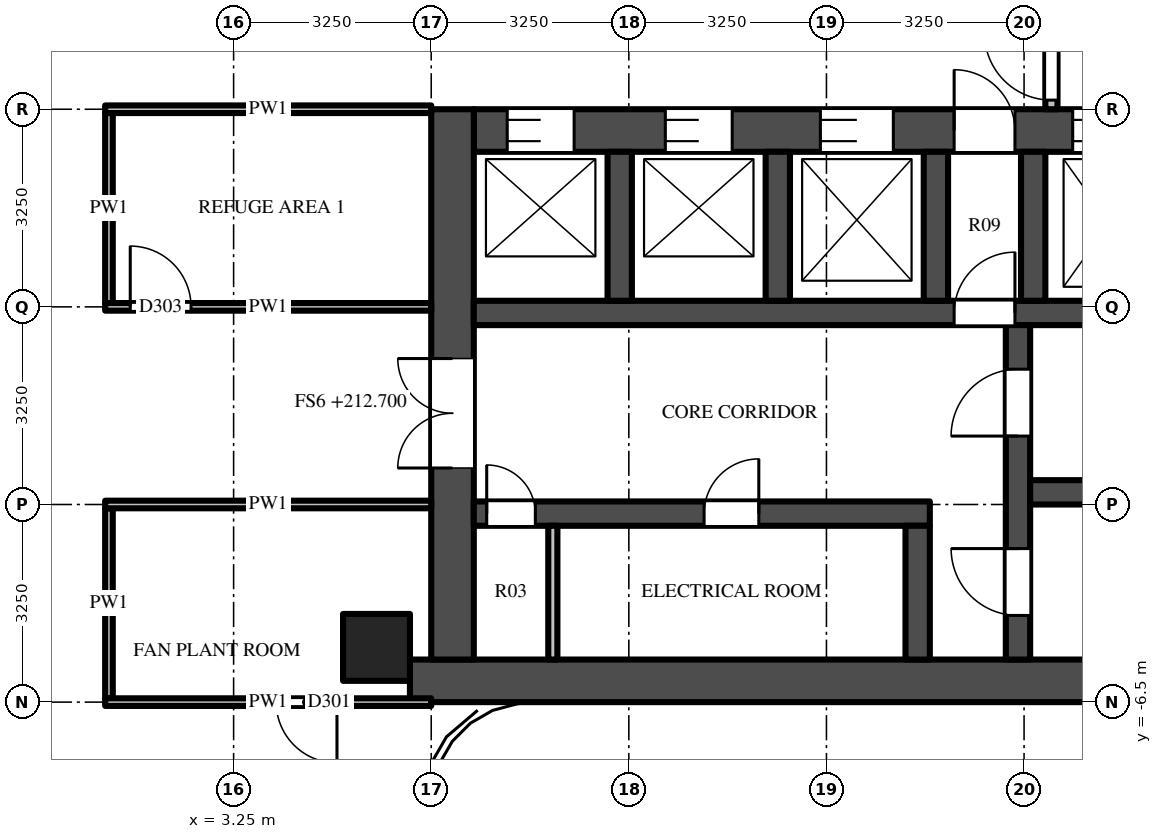
"""IFC4 building model, lengths in metres.
Left out: names, types, materials, properties, quantities, classifications, styles, units other than length and angle.
Written with IfcOpenShell. Run it as: python <this file> out.ifc"""

import sys

from ifc_helpers import new_model, si_unit, direction, frame, frame_2d, origin, origin_2d, place, context, subcontext, project, spatial, rectangle, extrude, source, transform, mapped, element, fill, save


model = new_model("IFC4")
c1 = context("Model", 3, precision=1e-05, world=origin(), true_north=direction((0.0, 1.0)))
c2 = subcontext(c1, "Body", "Model", "MODEL_VIEW")
j1 = project(units=[si_unit("LENGTHUNIT", "METRE"), si_unit("PLANEANGLEUNIT", "RADIAN")], contexts=[c1])
p1 = place(None, origin())
s1 = spatial("IfcSite", under=j1, at=p1, CompositionType="ELEMENT")
p2 = place(p1, origin())
s2 = spatial("IfcBuilding", under=s1, at=p2, CompositionType="ELEMENT")
p3 = place(p2, frame((0.0, 0.0, 212.7)))
s3 = spatial("IfcBuildingStorey", under=s2, at=p3, CompositionType="ELEMENT", Elevation=212.7)
m1 = source(origin(), c2, "Body", "SweptSolid", [
    extrude(rectangle(XDim=1.1, YDim=1.1, at=origin_2d()), origin(), (0.0, 0.0, 1.0), 8.0),
])
p4 = place(p3, frame((5.6, -5.6, 0.0), z_axis=(0.0, 0.0, 1.0), x_axis=(1.0, 0.0, 0.0)))
e1 = element("IfcColumn", 1, at=p4, inside=s3, PredefinedType="COLUMN", context=c2, shape_type="MappedRepresentation", body=[
    mapped(m1, transform((0.0, 0.0, 0.0))),
])
m2 = source(origin(), c2, "Body", "SweptSolid", [
    extrude(rectangle(XDim=16.6, YDim=0.7, at=frame_2d((8.3, 0.0))), origin(), (0.0, 0.0, 1.0), 7.8),
])
p5 = place(p3, frame((6.15, -6.15, 0.0), z_axis=(0.0, 0.0, 1.0), x_axis=(1.0, 0.0, 0.0)))
e2 = element("IfcWall", 2, at=p5, inside=s3, PredefinedType="SHEAR", context=c2, shape_type="MappedRepresentation", body=[
    mapped(m2, transform((0.0, 0.0, 0.0))),
])
m3 = source(origin(), c2, "Body", "SweptSolid", [
    extrude(rectangle(XDim=14.85, YDim=0.7, at=frame_2d((7.425, 0.0))), origin(), (0.0, 0.0, 1.0), 7.8),
])
p6 = place(p3, frame((7.2, 2.9, 0.0), z_axis=(0.0, 0.0, 1.0), x_axis=(1.0, 0.0, 0.0)))
e3 = element("IfcWall", 3, at=p6, inside=s3, PredefinedType="SHEAR", context=c2, shape_type="MappedRepresentation", body=[
    mapped(m3, transform((0.0, 0.0, 0.0))),
])
m4 = source(origin(), c2, "Body", "SweptSolid", [
    extrude(rectangle(XDim=1.1, YDim=2.1, at=frame_2d((0.55, 1.05))), frame((0.0, 0.36, 0.0), z_axis=(0.0, -1.0, 0.0), x_axis=(1.0, 0.0, 0.0)), (0.0, 0.0, 1.0), 0.72),
])
p7 = place(p6, frame((0.55, 0.0, 0.0)))
e4 = element("IfcOpeningElement", 4, at=p7, cuts=e3, PredefinedType="OPENING", context=c2, shape_type="MappedRepresentation", body=[
    mapped(m4, transform((0.0, 0.0, 0.0))),
])
p8 = place(p6, frame((3.15, 0.0, 0.0)))
e5 = element("IfcOpeningElement", 5, at=p8, cuts=e3, PredefinedType="OPENING", context=c2, shape_type="MappedRepresentation", body=[
    mapped(m4, transform((0.0, 0.0, 0.0))),
])
m5 = source(origin(), c2, "Body", "SweptSolid", [
    extrude(rectangle(XDim=1.2, YDim=2.1, at=frame_2d((0.6, 1.05))), frame((0.0, 0.36, 0.0), z_axis=(0.0, -1.0, 0.0), x_axis=(1.0, 0.0, 0.0)), (0.0, 0.0, 1.0), 0.72),
])
p9 = place(p6, frame((5.7, 0.0, 0.0)))
e6 = element("IfcOpeningElement", 6, at=p9, cuts=e3, PredefinedType="OPENING", context=c2, shape_type="MappedRepresentation", body=[
    mapped(m5, transform((0.0, 0.0, 0.0))),
])
m6 = source(origin(), c2, "Body", "SweptSolid", [
    extrude(rectangle(XDim=1.3, YDim=2.1, at=frame_2d((0.65, 1.05))), frame((0.0, 0.36, 0.0), z_axis=(0.0, -1.0, 0.0), x_axis=(1.0, 0.0, 0.0)), (0.0, 0.0, 1.0), 0.72),
])
p10 = place(p6, frame((12.2, 0.0, 0.0)))
e7 = element("IfcOpeningElement", 7, at=p10, cuts=e3, PredefinedType="OPENING", context=c2, shape_type="MappedRepresentation", body=[
    mapped(m6, transform((0.0, 0.0, 0.0))),
])
p11 = place(p6, frame((9.85, 0.0, 0.0)))
e8 = element("IfcOpeningElement", 8, at=p11, cuts=e3, PredefinedType="OPENING", context=c2, shape_type="MappedRepresentation", body=[
    mapped(m5, transform((0.0, 0.0, 0.0))),
])
m7 = source(origin(), c2, "Body", "SweptSolid", [
    extrude(rectangle(XDim=1.0, YDim=2.1, at=frame_2d((0.5, 1.05))), frame((0.0, 0.36, 0.0), z_axis=(0.0, -1.0, 0.0), x_axis=(1.0, 0.0, 0.0)), (0.0, 0.0, 1.0), 0.72),
])
p12 = place(p6, frame((7.9, 0.0, 0.0)))
e9 = element("IfcOpeningElement", 9, at=p12, cuts=e3, PredefinedType="OPENING", context=c2, shape_type="MappedRepresentation", body=[
    mapped(m7, transform((0.0, 0.0, 0.0))),
])
m8 = source(origin(), c2, "Body", "SweptSolid", [
    extrude(rectangle(XDim=9.05, YDim=0.7, at=frame_2d((4.525, 0.0))), origin(), (0.0, 0.0, 1.0), 7.8),
])
p13 = place(p3, frame((6.85, -5.8, 0.0), z_axis=(0.0, 0.0, 1.0), x_axis=(0.0, 1.0, 0.0)))
e10 = element("IfcWall", 10, at=p13, inside=s3, PredefinedType="SHEAR", context=c2, shape_type="MappedRepresentation", body=[
    mapped(m8, transform((0.0, 0.0, 0.0))),
])
m9 = source(origin(), c2, "Body", "SweptSolid", [
    extrude(rectangle(XDim=1.8, YDim=2.1, at=frame_2d((0.9, 1.05))), frame((0.0, 0.36, 0.0), z_axis=(0.0, -1.0, 0.0), x_axis=(1.0, 0.0, 0.0)), (0.0, 0.0, 1.0), 0.72),
])
p14 = place(p13, frame((3.15, 0.0, 0.0)))
e11 = element("IfcOpeningElement", 11, at=p14, cuts=e10, PredefinedType="OPENING", context=c2, shape_type="MappedRepresentation", body=[
    mapped(m9, transform((0.0, 0.0, 0.0))),
])
m10 = source(origin(), c2, "Body", "SweptSolid", [
    extrude(rectangle(XDim=7.5, YDim=0.4, at=frame_2d((3.75, 0.0))), origin(), (0.0, 0.0, 1.0), 7.8),
])
p15 = place(p3, frame((7.2, -3.4, 0.0), z_axis=(0.0, 0.0, 1.0), x_axis=(1.0, 0.0, 0.0)))
e12 = element("IfcWall", 12, at=p15, inside=s3, PredefinedType="SHEAR", context=c2, shape_type="MappedRepresentation", body=[
    mapped(m10, transform((0.0, 0.0, 0.0))),
])
m11 = source(origin(), c2, "Body", "SweptSolid", [
    extrude(rectangle(XDim=0.8, YDim=2.1, at=frame_2d((0.4, 1.05))), frame((0.0, 0.21, 0.0), z_axis=(0.0, -1.0, 0.0), x_axis=(1.0, 0.0, 0.0)), (0.0, 0.0, 1.0), 0.42),
])
p16 = place(p15, frame((0.212, 0.0, 0.0)))
e13 = element("IfcOpeningElement", 13, at=p16, cuts=e12, PredefinedType="OPENING", context=c2, shape_type="MappedRepresentation", body=[
    mapped(m11, transform((0.0, 0.0, 0.0))),
])
m12 = source(origin(), c2, "Body", "SweptSolid", [
    extrude(rectangle(XDim=0.9, YDim=2.1, at=frame_2d((0.45, 1.05))), frame((0.0, 0.21, 0.0), z_axis=(0.0, -1.0, 0.0), x_axis=(1.0, 0.0, 0.0)), (0.0, 0.0, 1.0), 0.42),
])
p17 = place(p15, frame((3.788, 0.0, 0.0)))
e14 = element("IfcOpeningElement", 14, at=p17, cuts=e12, PredefinedType="OPENING", context=c2, shape_type="MappedRepresentation", body=[
    mapped(m12, transform((0.0, 0.0, 0.0))),
])
m13 = source(origin(), c2, "Body", "SweptSolid", [
    extrude(rectangle(XDim=14.85, YDim=0.4, at=frame_2d((7.425, 0.0))), origin(), (0.0, 0.0, 1.0), 7.8),
])
p18 = place(p3, frame((7.2, -0.1, 0.0), z_axis=(0.0, 0.0, 1.0), x_axis=(1.0, 0.0, 0.0)))
e15 = element("IfcWall", 15, at=p18, inside=s3, PredefinedType="SHEAR", context=c2, shape_type="MappedRepresentation", body=[
    mapped(m13, transform((0.0, 0.0, 0.0))),
])
m14 = source(origin(), c2, "Body", "SweptSolid", [
    extrude(rectangle(XDim=1.0, YDim=2.1, at=frame_2d((0.5, 1.05))), frame((0.0, 0.21, 0.0), z_axis=(0.0, -1.0, 0.0), x_axis=(1.0, 0.0, 0.0)), (0.0, 0.0, 1.0), 0.42),
])
p19 = place(p18, frame((7.9, 0.0, 0.0)))
e16 = element("IfcOpeningElement", 16, at=p19, cuts=e15, PredefinedType="OPENING", context=c2, shape_type="MappedRepresentation", body=[
    mapped(m14, transform((0.0, 0.0, 0.0))),
])
m15 = source(origin(), c2, "Body", "SweptSolid", [
    extrude(rectangle(XDim=5.5, YDim=0.4, at=frame_2d((2.75, 0.0))), origin(), (0.0, 0.0, 1.0), 7.8),
])
p20 = place(p3, frame((16.15, -5.8, 0.0), z_axis=(0.0, 0.0, 1.0), x_axis=(0.0, 1.0, 0.0)))
e17 = element("IfcWall", 17, at=p20, inside=s3, PredefinedType="SHEAR", context=c2, shape_type="MappedRepresentation", body=[
    mapped(m15, transform((0.0, 0.0, 0.0))),
])
m16 = source(origin(), c2, "Body", "SweptSolid", [
    extrude(rectangle(XDim=1.1, YDim=2.1, at=frame_2d((0.55, 1.05))), frame((0.0, 0.21, 0.0), z_axis=(0.0, -1.0, 0.0), x_axis=(1.0, 0.0, 0.0)), (0.0, 0.0, 1.0), 0.42),
])
p21 = place(p20, frame((0.725, 0.0, 0.0)))
e18 = element("IfcOpeningElement", 18, at=p21, cuts=e17, PredefinedType="OPENING", context=c2, shape_type="MappedRepresentation", body=[
    mapped(m16, transform((0.0, 0.0, 0.0))),
])
p22 = place(p20, frame((3.675, 0.0, 0.0)))
e19 = element("IfcOpeningElement", 19, at=p22, cuts=e17, PredefinedType="OPENING", context=c2, shape_type="MappedRepresentation", body=[
    mapped(m16, transform((0.0, 0.0, 0.0))),
])
m17 = source(origin(), c2, "Body", "SweptSolid", [
    extrude(rectangle(XDim=5.7, YDim=0.4, at=frame_2d((2.85, 0.0))), origin(), (0.0, 0.0, 1.0), 7.8),
])
p23 = place(p3, frame((16.35, -3.05, 0.0), z_axis=(0.0, 0.0, 1.0), x_axis=(1.0, 0.0, 0.0)))
e20 = element("IfcWall", 20, at=p23, inside=s3, PredefinedType="SHEAR", context=c2, shape_type="MappedRepresentation", body=[
    mapped(m17, transform((0.0, 0.0, 0.0))),
])
m18 = source(origin(), c2, "Body", "SweptSolid", [
    extrude(rectangle(XDim=2.2, YDim=0.4, at=frame_2d((1.1, 0.0))), origin(), (0.0, 0.0, 1.0), 7.8),
])
p24 = place(p3, frame((14.5, -5.8, 0.0), z_axis=(0.0, 0.0, 1.0), x_axis=(0.0, 1.0, 0.0)))
e21 = element("IfcWall", 21, at=p24, inside=s3, PredefinedType="SHEAR", context=c2, shape_type="MappedRepresentation", body=[
    mapped(m18, transform((0.0, 0.0, 0.0))),
])
m19 = source(origin(), c2, "Body", "SweptSolid", [
    extrude(rectangle(XDim=2.45, YDim=0.4, at=frame_2d((1.225, 0.0))), origin(), (0.0, 0.0, 1.0), 7.8),
])
for number, where, z_axis, x_axis in (
    (22, (9.6, 0.1, 0.0), (0.0, 0.0, 1.0), (0.0, 1.0, 0.0)),
    (23, (12.2, 0.1, 0.0), (0.0, 0.0, 1.0), (0.0, 1.0, 0.0)),
    (24, (14.8, 0.1, 0.0), (0.0, 0.0, 1.0), (0.0, 1.0, 0.0)),
    (25, (16.4, 0.1, 0.0), (0.0, 0.0, 1.0), (0.0, 1.0, 0.0)),
):
    element("IfcWall", number, at=place(p3, frame(where, z_axis=z_axis, x_axis=x_axis)), inside=s3, PredefinedType="SHEAR", context=c2, shape_type="MappedRepresentation", body=[
        mapped(m19, transform((0.0, 0.0, 0.0))),
    ])
m20 = source(origin(), c2, "Body", "SweptSolid", [
    extrude(rectangle(XDim=3.25, YDim=0.2, at=frame_2d((1.625, 0.0))), origin(), (0.0, 0.0, 1.0), 7.8),
])
p25 = place(p3, frame((16.7, 3.25, 0.0), z_axis=(0.0, 0.0, 1.0), x_axis=(0.0, 1.0, 0.0)))
e26 = element("IfcWall", 26, at=p25, inside=s3, PredefinedType="PARTITIONING", context=c2, shape_type="MappedRepresentation", body=[
    mapped(m20, transform((0.0, 0.0, 0.0))),
])
m21 = source(origin(), c2, "Body", "SweptSolid", [
    extrude(rectangle(XDim=1.1, YDim=2.1, at=frame_2d((0.55, 1.05))), frame((0.0, 0.11, 0.0), z_axis=(0.0, -1.0, 0.0), x_axis=(1.0, 0.0, 0.0)), (0.0, 0.0, 1.0), 0.22),
])
p26 = place(p25, frame((0.15, 0.0, 0.0)))
e27 = element("IfcOpeningElement", 27, at=p26, cuts=e26, PredefinedType="OPENING", context=c2, shape_type="MappedRepresentation", body=[
    mapped(m21, transform((0.0, 0.0, 0.0))),
])
m22 = source(origin(), c2, "Body", "SweptSolid", [
    extrude(rectangle(XDim=2.2, YDim=0.15, at=frame_2d((1.1, 0.0))), origin(), (0.0, 0.0, 1.0), 7.8),
])
p27 = place(p3, frame((8.5, -5.8, 0.0), z_axis=(0.0, 0.0, 1.0), x_axis=(0.0, 1.0, 0.0)))
e28 = element("IfcWall", 28, at=p27, inside=s3, PredefinedType="PARTITIONING", context=c2, shape_type="MappedRepresentation", body=[
    mapped(m22, transform((0.0, 0.0, 0.0))),
])
m23 = source(origin(), c2, "Body", "SweptSolid", [
    extrude(rectangle(XDim=3.125, YDim=0.125, at=frame_2d((1.562, 0.0))), origin(), (0.0, 0.0, 1.0), 7.096),
])
p28 = place(p3, frame((1.2, -6.438, 0.0), z_axis=(0.0, 0.0, 1.0), x_axis=(0.0, 1.0, 0.0)))
e29 = element("IfcWall", 29, at=p28, inside=s3, PredefinedType="PARTITIONING", context=c2, shape_type="MappedRepresentation", body=[
    mapped(m23, transform((0.0, 0.0, 0.0))),
])
m24 = source(origin(), c2, "Body", "SweptSolid", [
    extrude(rectangle(XDim=3.125, YDim=0.125, at=frame_2d((1.562, 0.0))), origin(), (0.0, 0.0, 1.0), 7.168),
])
p29 = place(p3, frame((1.2, 0.062, 0.0), z_axis=(0.0, 0.0, 1.0), x_axis=(0.0, 1.0, 0.0)))
e30 = element("IfcWall", 30, at=p29, inside=s3, PredefinedType="PARTITIONING", context=c2, shape_type="MappedRepresentation", body=[
    mapped(m24, transform((0.0, 0.0, 0.0))),
])
m25 = source(origin(), c2, "Body", "SweptSolid", [
    extrude(rectangle(XDim=5.363, YDim=0.125, at=frame_2d((2.681, 0.0))), origin(), (0.0, 0.0, 1.0), 7.28),
])
p30 = place(p3, frame((6.5, -6.5, 0.0), z_axis=(0.0, 0.0, 1.0), x_axis=(-1.0, 0.0, 0.0)))
e31 = element("IfcWall", 31, at=p30, inside=s3, PredefinedType="PARTITIONING", context=c2, shape_type="MappedRepresentation", body=[
    mapped(m25, transform((0.0, 0.0, 0.0))),
])
m26 = source(origin(), c2, "Body", "SweptSolid", [
    extrude(rectangle(XDim=1.0, YDim=2.1, at=frame_2d((0.5, 1.05))), frame((0.0, 0.073, 0.0), z_axis=(0.0, -1.0, 0.0), x_axis=(1.0, 0.0, 0.0)), (0.0, 0.0, 1.0), 0.145),
])
p31 = place(p30, frame((1.55, 0.0, 0.0)))
e32 = element("IfcOpeningElement", 32, at=p31, cuts=e31, PredefinedType="OPENING", context=c2, shape_type="MappedRepresentation", body=[
    mapped(m26, transform((0.0, 0.0, 0.0))),
])
m27 = source(origin(), c2, "Body", "SweptSolid", [
    extrude(rectangle(XDim=5.363, YDim=0.125, at=frame_2d((2.681, 0.0))), origin(), (0.0, 0.0, 1.0), 7.096),
])
p32 = place(p3, frame((6.5, -3.25, 0.0), z_axis=(0.0, 0.0, 1.0), x_axis=(-1.0, 0.0, 0.0)))
e33 = element("IfcWall", 33, at=p32, inside=s3, PredefinedType="PARTITIONING", context=c2, shape_type="MappedRepresentation", body=[
    mapped(m27, transform((0.0, 0.0, 0.0))),
])
p33 = place(p3, frame((1.137, 0.0, 0.0), z_axis=(0.0, 0.0, 1.0), x_axis=(1.0, 0.0, 0.0)))
e34 = element("IfcWall", 34, at=p33, inside=s3, PredefinedType="PARTITIONING", context=c2, shape_type="MappedRepresentation", body=[
    mapped(m27, transform((0.0, 0.0, 0.0))),
])
p34 = place(p33, frame((0.413, 0.0, 0.0)))
e35 = element("IfcOpeningElement", 35, at=p34, cuts=e34, PredefinedType="OPENING", context=c2, shape_type="MappedRepresentation", body=[
    mapped(m26, transform((0.0, 0.0, 0.0))),
])
p35 = place(p3, frame((1.137, 3.25, 0.0), z_axis=(0.0, 0.0, 1.0), x_axis=(1.0, 0.0, 0.0)))
e36 = element("IfcWall", 36, at=p35, inside=s3, PredefinedType="PARTITIONING", context=c2, shape_type="MappedRepresentation", body=[
    mapped(m27, transform((0.0, 0.0, 0.0))),
])
m28 = source(origin(), c2, "Body", "SweptSolid", [
    extrude(rectangle(XDim=1.1, YDim=2.1, at=frame_2d((0.55, 1.05))), frame((0.0, -0.275, 0.0), z_axis=(0.0, -1.0, 0.0), x_axis=(1.0, 0.0, 0.0)), (0.0, 0.0, 1.0), 0.05),
])
p36 = place(p7, origin())
e37 = element("IfcDoor", 37, at=p36, inside=s3, OperationType="DOUBLE_DOOR_SLIDING", PredefinedType="DOOR", context=c2, shape_type="MappedRepresentation", body=[
    mapped(m28, transform((0.0, 0.0, 0.0))),
])
fill(e4, e37)
p37 = place(p8, origin())
e38 = element("IfcDoor", 38, at=p37, inside=s3, OperationType="DOUBLE_DOOR_SLIDING", PredefinedType="DOOR", context=c2, shape_type="MappedRepresentation", body=[
    mapped(m28, transform((0.0, 0.0, 0.0))),
])
fill(e5, e38)
m29 = source(origin(), c2, "Body", "SweptSolid", [
    extrude(rectangle(XDim=1.2, YDim=2.1, at=frame_2d((0.6, 1.05))), frame((0.0, -0.275, 0.0), z_axis=(0.0, -1.0, 0.0), x_axis=(1.0, 0.0, 0.0)), (0.0, 0.0, 1.0), 0.05),
])
p38 = place(p9, origin())
e39 = element("IfcDoor", 39, at=p38, inside=s3, OperationType="DOUBLE_DOOR_SLIDING", PredefinedType="DOOR", context=c2, shape_type="MappedRepresentation", body=[
    mapped(m29, transform((0.0, 0.0, 0.0))),
])
fill(e6, e39)
p39 = place(p11, origin())
e40 = element("IfcDoor", 40, at=p39, inside=s3, OperationType="DOUBLE_DOOR_SLIDING", PredefinedType="DOOR", context=c2, shape_type="MappedRepresentation", body=[
    mapped(m29, transform((0.0, 0.0, 0.0))),
])
fill(e8, e40)
m30 = source(origin(), c2, "Body", "SweptSolid", [
    extrude(rectangle(XDim=1.8, YDim=2.1, at=frame_2d((0.9, 1.05))), frame((0.0, -0.275, 0.0), z_axis=(0.0, -1.0, 0.0), x_axis=(1.0, 0.0, 0.0)), (0.0, 0.0, 1.0), 0.05),
])
p40 = place(p14, origin())
e41 = element("IfcDoor", 41, at=p40, inside=s3, OperationType="DOUBLE_DOOR_SINGLE_SWING", PredefinedType="DOOR", context=c2, shape_type="MappedRepresentation", body=[
    mapped(m30, transform((0.0, 0.0, 0.0))),
])
fill(e11, e41)
m31 = source(origin(), c2, "Body", "SweptSolid", [
    extrude(rectangle(XDim=1.1, YDim=2.1, at=frame_2d((0.55, 1.05))), frame((0.0, 0.025, 0.0), z_axis=(0.0, -1.0, 0.0), x_axis=(1.0, 0.0, 0.0)), (0.0, 0.0, 1.0), 0.05),
])
p41 = place(p21, origin())
e42 = element("IfcDoor", 42, at=p41, inside=s3, OperationType="SINGLE_SWING_RIGHT", PredefinedType="DOOR", context=c2, shape_type="MappedRepresentation", body=[
    mapped(m31, transform((0.0, 0.0, 0.0))),
])
fill(e18, e42)
p42 = place(p22, origin())
e43 = element("IfcDoor", 43, at=p42, inside=s3, OperationType="SINGLE_SWING_LEFT", PredefinedType="DOOR", context=c2, shape_type="MappedRepresentation", body=[
    mapped(m31, transform((0.0, 0.0, 0.0))),
])
fill(e19, e43)
m32 = source(origin(), c2, "Body", "SweptSolid", [
    extrude(rectangle(XDim=1.0, YDim=2.1, at=frame_2d((0.5, 1.05))), frame((0.0, 0.025, 0.0), z_axis=(0.0, -1.0, 0.0), x_axis=(1.0, 0.0, 0.0)), (0.0, 0.0, 1.0), 0.05),
])
p43 = place(p19, origin())
e44 = element("IfcDoor", 44, at=p43, inside=s3, OperationType="SINGLE_SWING_RIGHT", PredefinedType="DOOR", context=c2, shape_type="MappedRepresentation", body=[
    mapped(m32, transform((0.0, 0.0, 0.0))),
])
fill(e16, e44)
m33 = source(origin(), c2, "Body", "SweptSolid", [
    extrude(rectangle(XDim=1.0, YDim=2.1, at=frame_2d((0.5, 1.05))), frame((0.0, -0.275, 0.0), z_axis=(0.0, -1.0, 0.0), x_axis=(1.0, 0.0, 0.0)), (0.0, 0.0, 1.0), 0.05),
])
p44 = place(p12, origin())
e45 = element("IfcDoor", 45, at=p44, inside=s3, OperationType="SINGLE_SWING_LEFT", PredefinedType="DOOR", context=c2, shape_type="MappedRepresentation", body=[
    mapped(m33, transform((0.0, 0.0, 0.0))),
])
fill(e9, e45)
p45 = place(p26, origin())
e46 = element("IfcDoor", 46, at=p45, inside=s3, OperationType="SINGLE_SWING_RIGHT", PredefinedType="DOOR", context=c2, shape_type="MappedRepresentation", body=[
    mapped(m31, transform((0.0, 0.0, 0.0))),
])
fill(e27, e46)
m34 = source(origin(), c2, "Body", "SweptSolid", [
    extrude(rectangle(XDim=0.8, YDim=2.1, at=frame_2d((0.4, 1.05))), frame((0.0, 0.025, 0.0), z_axis=(0.0, -1.0, 0.0), x_axis=(1.0, 0.0, 0.0)), (0.0, 0.0, 1.0), 0.05),
])
p46 = place(p16, origin())
e47 = element("IfcDoor", 47, at=p46, inside=s3, OperationType="SINGLE_SWING_LEFT", PredefinedType="DOOR", context=c2, shape_type="MappedRepresentation", body=[
    mapped(m34, transform((0.0, 0.0, 0.0))),
])
fill(e13, e47)
m35 = source(origin(), c2, "Body", "SweptSolid", [
    extrude(rectangle(XDim=0.9, YDim=2.1, at=frame_2d((0.45, 1.05))), frame((0.0, 0.025, 0.0), z_axis=(0.0, -1.0, 0.0), x_axis=(1.0, 0.0, 0.0)), (0.0, 0.0, 1.0), 0.05),
])
p47 = place(p17, origin())
e48 = element("IfcDoor", 48, at=p47, inside=s3, OperationType="SINGLE_SWING_RIGHT", PredefinedType="DOOR", context=c2, shape_type="MappedRepresentation", body=[
    mapped(m35, transform((0.0, 0.0, 0.0))),
])
fill(e14, e48)
p48 = place(p31, origin())
e49 = element("IfcDoor", 49, at=p48, inside=s3, OperationType="SINGLE_SWING_LEFT", PredefinedType="DOOR", context=c2, shape_type="MappedRepresentation", body=[
    mapped(m32, transform((0.0, 0.0, 0.0))),
])
fill(e32, e49)
p49 = place(p34, origin())
e50 = element("IfcDoor", 50, at=p49, inside=s3, OperationType="SINGLE_SWING_LEFT", PredefinedType="DOOR", context=c2, shape_type="MappedRepresentation", body=[
    mapped(m32, transform((0.0, 0.0, 0.0))),
])
fill(e35, e50)
save(model, sys.argv[1])
